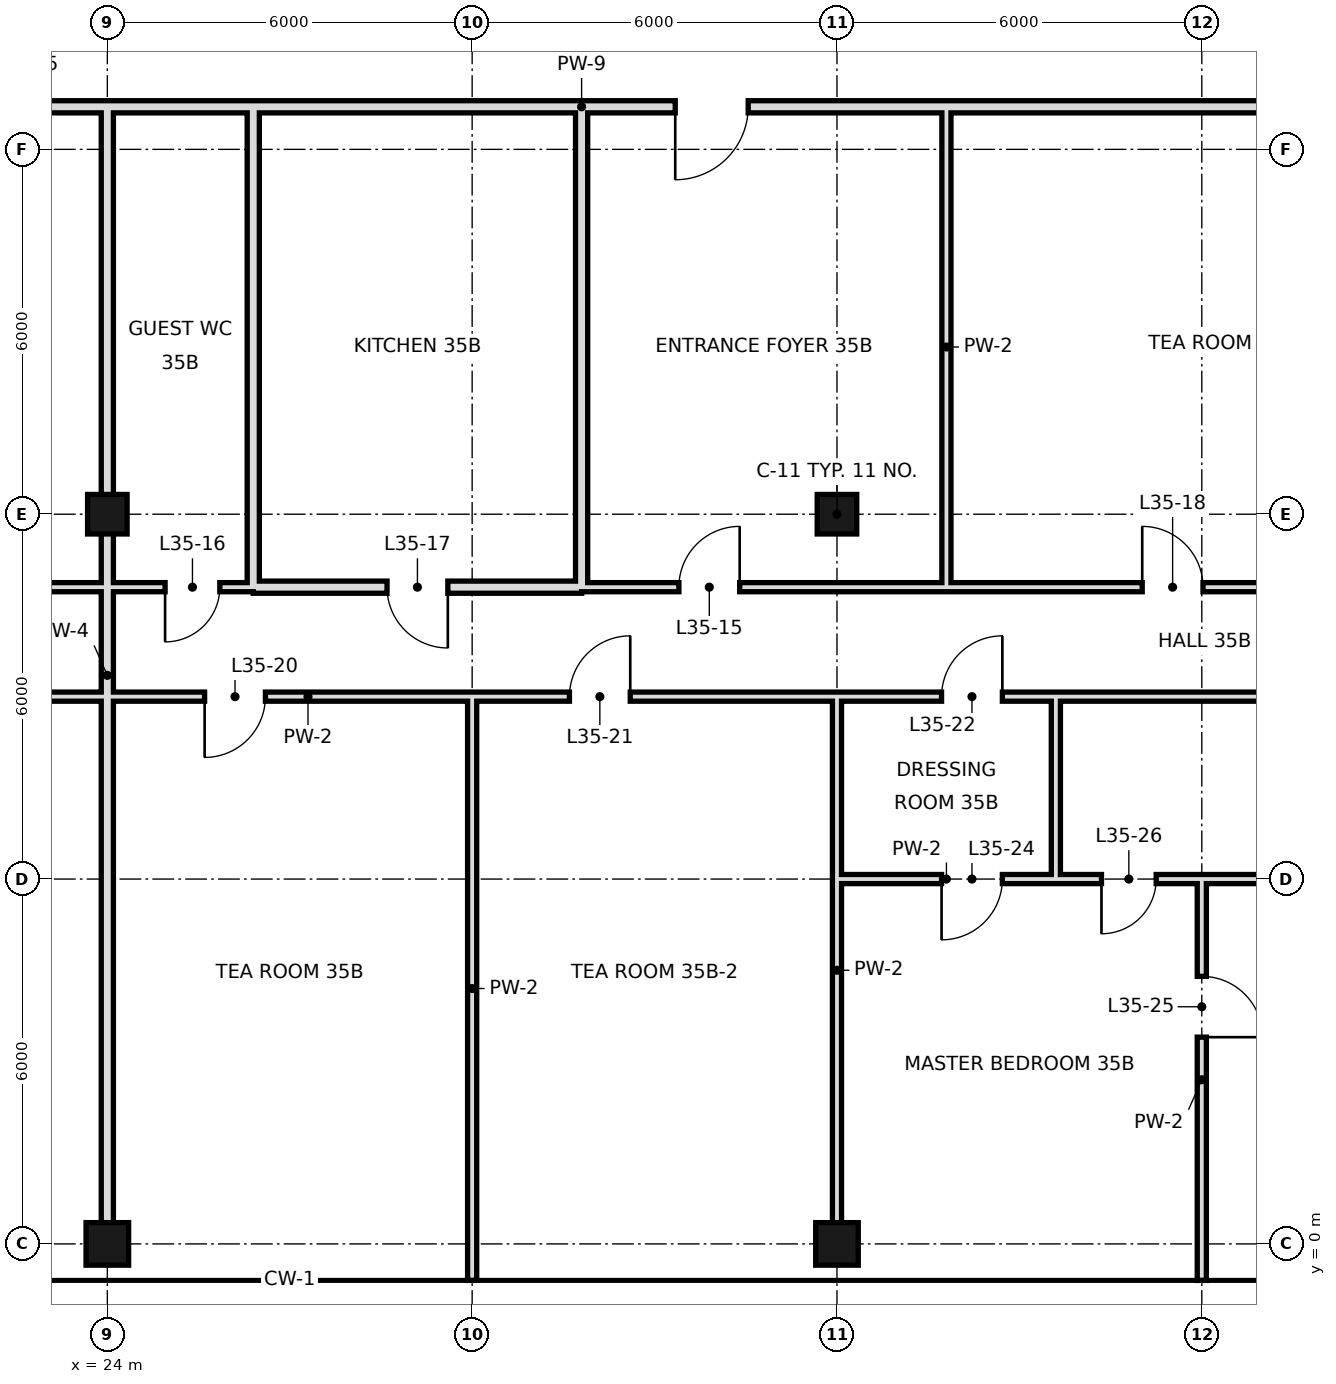
"""IFC4 building model, lengths in metres.
Left out: names, types, materials, properties, quantities, classifications, styles, units other than length and angle.
Written with IfcOpenShell. Run it as: python <this file> out.ifc"""

import sys

from ifc_helpers import new_model, si_unit, direction, frame, frame_2d, origin, origin_2d, place, context, subcontext, project, spatial, rectangle, hollow_rectangle, extrude, element, fill, save


model = new_model("IFC4")
c1 = context("Model", 3, precision=1e-05, world=origin(), true_north=direction((0.0, 1.0)))
c2 = subcontext(c1, "Body", "Model", "MODEL_VIEW")
j1 = project(units=[si_unit("LENGTHUNIT", "METRE"), si_unit("PLANEANGLEUNIT", "RADIAN")], contexts=[c1])
p1 = place(None, origin())
s1 = spatial("IfcSite", under=j1, at=p1, CompositionType="ELEMENT")
p2 = place(p1, origin())
s2 = spatial("IfcBuilding", under=s1, at=p2, CompositionType="ELEMENT")
p3 = place(p2, frame((0.0, 0.0, 154.6)))
s3 = spatial("IfcBuildingStorey", under=s2, at=p3, CompositionType="ELEMENT", Elevation=154.6)
p4 = place(p3, frame((24.0, 0.0, 0.0), z_axis=(0.0, 0.0, 1.0), x_axis=(1.0, 0.0, 0.0)))
e1 = element("IfcColumn", 1, at=p4, inside=s3, PredefinedType="COLUMN", context=c2, shape_type="SweptSolid", body=[
    extrude(hollow_rectangle(XDim=0.7, YDim=0.7, WallThickness=0.036, at=origin_2d()), origin(), (0.0, 0.0, 1.0), 3.6),
])
p5 = place(p3, frame((24.0, 12.0, 0.0), z_axis=(0.0, 0.0, 1.0), x_axis=(1.0, 0.0, 0.0)))
e2 = element("IfcColumn", 2, at=p5, inside=s3, PredefinedType="COLUMN", context=c2, shape_type="SweptSolid", body=[
    extrude(hollow_rectangle(XDim=0.65, YDim=0.65, WallThickness=0.032, at=origin_2d()), origin(), (0.0, 0.0, 1.0), 3.6),
])
p6 = place(p3, frame((36.0, 0.0, 0.0), z_axis=(0.0, 0.0, 1.0), x_axis=(1.0, 0.0, 0.0)))
e3 = element("IfcColumn", 3, at=p6, inside=s3, PredefinedType="COLUMN", context=c2, shape_type="SweptSolid", body=[
    extrude(hollow_rectangle(XDim=0.7, YDim=0.7, WallThickness=0.036, at=origin_2d()), origin(), (0.0, 0.0, 1.0), 3.6),
])
p7 = place(p3, frame((36.0, 12.0, 0.0), z_axis=(0.0, 0.0, 1.0), x_axis=(1.0, 0.0, 0.0)))
e4 = element("IfcColumn", 4, at=p7, inside=s3, PredefinedType="COLUMN", context=c2, shape_type="SweptSolid", body=[
    extrude(hollow_rectangle(XDim=0.65, YDim=0.65, WallThickness=0.032, at=origin_2d()), origin(), (0.0, 0.0, 1.0), 3.6),
])
p8 = place(p3, frame((24.0, 0.0, 0.0), z_axis=(0.0, 0.0, 1.0), x_axis=(0.0, 1.0, 0.0)))
e5 = element("IfcWall", 5, at=p8, inside=s3, PredefinedType="SOLIDWALL", context=c2, shape_type="SweptSolid", body=[
    extrude(rectangle(XDim=18.7, YDim=0.2, at=frame_2d((9.35, 0.0))), origin(), (0.0, 0.0, 1.0), 2.72),
])
p9 = place(p3, frame((26.4, 10.8, 0.0), z_axis=(0.0, 0.0, 1.0), x_axis=(0.0, 1.0, 0.0)))
e6 = element("IfcWall", 6, at=p9, inside=s3, PredefinedType="SOLIDWALL", context=c2, shape_type="SweptSolid", body=[
    extrude(rectangle(XDim=7.9, YDim=0.2, at=frame_2d((3.95, 0.0))), origin(), (0.0, 0.0, 1.0), 2.72),
])
p10 = place(p3, frame((30.0, -0.6, 0.0), z_axis=(0.0, 0.0, 1.0), x_axis=(0.0, 1.0, 0.0)))
e7 = element("IfcWall", 7, at=p10, inside=s3, PredefinedType="PARTITIONING", context=c2, shape_type="SweptSolid", body=[
    extrude(rectangle(XDim=9.6, YDim=0.15, at=frame_2d((4.8, 0.0))), origin(), (0.0, 0.0, 1.0), 2.72),
])
p11 = place(p3, frame((31.8, 10.8, 0.0), z_axis=(0.0, 0.0, 1.0), x_axis=(0.0, 1.0, 0.0)))
e8 = element("IfcWall", 8, at=p11, inside=s3, PredefinedType="SOLIDWALL", context=c2, shape_type="SweptSolid", body=[
    extrude(rectangle(XDim=7.9, YDim=0.2, at=frame_2d((3.95, 0.0))), origin(), (0.0, 0.0, 1.0), 3.42),
])
p12 = place(p3, frame((36.0, 0.0, 0.0), z_axis=(0.0, 0.0, 1.0), x_axis=(0.0, 1.0, 0.0)))
e9 = element("IfcWall", 9, at=p12, inside=s3, PredefinedType="PARTITIONING", context=c2, shape_type="SweptSolid", body=[
    extrude(rectangle(XDim=9.0, YDim=0.15, at=frame_2d((4.5, 0.0))), origin(), (0.0, 0.0, 1.0), 2.72),
])
p13 = place(p3, frame((37.8, 10.8, 0.0), z_axis=(0.0, 0.0, 1.0), x_axis=(0.0, 1.0, 0.0)))
e10 = element("IfcWall", 10, at=p13, inside=s3, PredefinedType="PARTITIONING", context=c2, shape_type="SweptSolid", body=[
    extrude(rectangle(XDim=7.9, YDim=0.15, at=frame_2d((3.95, 0.0))), origin(), (0.0, 0.0, 1.0), 3.42),
])
p14 = place(p3, frame((39.6, 6.0, 0.0), z_axis=(0.0, 0.0, 1.0), x_axis=(0.0, 1.0, 0.0)))
e11 = element("IfcWall", 11, at=p14, inside=s3, PredefinedType="PARTITIONING", context=c2, shape_type="SweptSolid", body=[
    extrude(rectangle(XDim=3.0, YDim=0.15, at=frame_2d((1.5, 0.0))), origin(), (0.0, 0.0, 1.0), 3.42),
])
p15 = place(p3, frame((42.0, -0.6, 0.0), z_axis=(0.0, 0.0, 1.0), x_axis=(0.0, 1.0, 0.0)))
e12 = element("IfcWall", 12, at=p15, inside=s3, PredefinedType="PARTITIONING", context=c2, shape_type="SweptSolid", body=[
    extrude(rectangle(XDim=6.6, YDim=0.15, at=frame_2d((3.3, 0.0))), origin(), (0.0, 0.0, 1.0), 2.72),
])
p16 = place(p15, frame((4.0, 0.0, 0.0)))
e13 = element("IfcOpeningElement", 13, at=p16, cuts=e12, PredefinedType="OPENING", context=c2, shape_type="SweptSolid", body=[
    extrude(rectangle(XDim=1.0, YDim=2.4, at=frame_2d((0.5, 1.2))), frame((0.0, 0.085, 0.0), z_axis=(0.0, -1.0, 0.0), x_axis=(1.0, 0.0, 0.0)), (0.0, 0.0, 1.0), 0.17),
])
p17 = place(p3, frame((26.4, 10.8, 0.0), z_axis=(0.0, 0.0, 1.0), x_axis=(1.0, 0.0, 0.0)))
e14 = element("IfcWall", 14, at=p17, inside=s3, PredefinedType="SOLIDWALL", context=c2, shape_type="SweptSolid", body=[
    extrude(rectangle(XDim=5.4, YDim=0.2, at=frame_2d((2.7, 0.0))), origin(), (0.0, 0.0, 1.0), 2.72),
])
p18 = place(p17, frame((2.2, 0.0, 0.0)))
e15 = element("IfcOpeningElement", 15, at=p18, cuts=e14, PredefinedType="OPENING", context=c2, shape_type="SweptSolid", body=[
    extrude(rectangle(XDim=1.0, YDim=2.4, at=frame_2d((0.5, 1.2))), frame((0.0, 0.11, 0.0), z_axis=(0.0, -1.0, 0.0), x_axis=(1.0, 0.0, 0.0)), (0.0, 0.0, 1.0), 0.22),
])
p19 = place(p3, frame((19.2, 10.8, 0.0), z_axis=(0.0, 0.0, 1.0), x_axis=(1.0, 0.0, 0.0)))
e16 = element("IfcWall", 16, at=p19, inside=s3, PredefinedType="PARTITIONING", context=c2, shape_type="SweptSolid", body=[
    extrude(rectangle(XDim=4.8, YDim=0.15, at=frame_2d((2.4, 0.0))), origin(), (0.0, 0.0, 1.0), 3.42),
])
p20 = place(p19, frame((1.9, 0.0, 0.0)))
e17 = element("IfcOpeningElement", 17, at=p20, cuts=e16, PredefinedType="OPENING", context=c2, shape_type="SweptSolid", body=[
    extrude(rectangle(XDim=1.0, YDim=2.4, at=frame_2d((0.5, 1.2))), frame((0.0, 0.085, 0.0), z_axis=(0.0, -1.0, 0.0), x_axis=(1.0, 0.0, 0.0)), (0.0, 0.0, 1.0), 0.17),
])
p21 = place(p3, frame((31.8, 10.8, 0.0), z_axis=(0.0, 0.0, 1.0), x_axis=(1.0, 0.0, 0.0)))
e18 = element("IfcWall", 18, at=p21, inside=s3, PredefinedType="PARTITIONING", context=c2, shape_type="SweptSolid", body=[
    extrude(rectangle(XDim=28.8, YDim=0.15, at=frame_2d((14.4, 0.0))), origin(), (0.0, 0.0, 1.0), 3.42),
])
p22 = place(p21, frame((1.6, 0.0, 0.0)))
e19 = element("IfcOpeningElement", 19, at=p22, cuts=e18, PredefinedType="OPENING", context=c2, shape_type="SweptSolid", body=[
    extrude(rectangle(XDim=1.0, YDim=2.4, at=frame_2d((0.5, 1.2))), frame((0.0, 0.085, 0.0), z_axis=(0.0, -1.0, 0.0), x_axis=(1.0, 0.0, 0.0)), (0.0, 0.0, 1.0), 0.17),
])
p23 = place(p21, frame((9.22, 0.0, 0.0)))
e20 = element("IfcOpeningElement", 20, at=p23, cuts=e18, PredefinedType="OPENING", context=c2, shape_type="SweptSolid", body=[
    extrude(rectangle(XDim=1.0, YDim=2.4, at=frame_2d((0.5, 1.2))), frame((0.0, 0.085, 0.0), z_axis=(0.0, -1.0, 0.0), x_axis=(1.0, 0.0, 0.0)), (0.0, 0.0, 1.0), 0.17),
])
p24 = place(p21, frame((17.65, 0.0, 0.0)))
e21 = element("IfcOpeningElement", 21, at=p24, cuts=e18, PredefinedType="OPENING", context=c2, shape_type="SweptSolid", body=[
    extrude(rectangle(XDim=1.0, YDim=2.4, at=frame_2d((0.5, 1.2))), frame((0.0, 0.085, 0.0), z_axis=(0.0, -1.0, 0.0), x_axis=(1.0, 0.0, 0.0)), (0.0, 0.0, 1.0), 0.17),
])
p25 = place(p3, frame((24.0, 10.8, 0.0), z_axis=(0.0, 0.0, 1.0), x_axis=(1.0, 0.0, 0.0)))
e22 = element("IfcWall", 22, at=p25, inside=s3, PredefinedType="PARTITIONING", context=c2, shape_type="SweptSolid", body=[
    extrude(rectangle(XDim=2.4, YDim=0.15, at=frame_2d((1.2, 0.0))), origin(), (0.0, 0.0, 1.0), 3.42),
])
p26 = place(p25, frame((0.95, 0.0, 0.0)))
e23 = element("IfcOpeningElement", 23, at=p26, cuts=e22, PredefinedType="OPENING", context=c2, shape_type="SweptSolid", body=[
    extrude(rectangle(XDim=0.9, YDim=2.4, at=frame_2d((0.45, 1.2))), frame((0.0, 0.085, 0.0), z_axis=(0.0, -1.0, 0.0), x_axis=(1.0, 0.0, 0.0)), (0.0, 0.0, 1.0), 0.17),
])
p27 = place(p3, frame((19.2, 18.7, 0.0), z_axis=(0.0, 0.0, 1.0), x_axis=(1.0, 0.0, 0.0)))
e24 = element("IfcWall", 24, at=p27, inside=s3, PredefinedType="SOLIDWALL", context=c2, shape_type="SweptSolid", body=[
    extrude(rectangle(XDim=7.2, YDim=0.2, at=frame_2d((3.6, 0.0))), origin(), (0.0, 0.0, 1.0), 3.42),
])
p28 = place(p27, frame((1.8, 0.0, 0.0)))
e25 = element("IfcOpeningElement", 25, at=p28, cuts=e24, PredefinedType="OPENING", context=c2, shape_type="SweptSolid", body=[
    extrude(rectangle(XDim=1.2, YDim=2.4, at=frame_2d((0.6, 1.2))), frame((0.0, 0.11, 0.0), z_axis=(0.0, -1.0, 0.0), x_axis=(1.0, 0.0, 0.0)), (0.0, 0.0, 1.0), 0.22),
])
p29 = place(p3, frame((31.8, 18.7, 0.0), z_axis=(0.0, 0.0, 1.0), x_axis=(1.0, 0.0, 0.0)))
e26 = element("IfcWall", 26, at=p29, inside=s3, PredefinedType="SOLIDWALL", context=c2, shape_type="SweptSolid", body=[
    extrude(rectangle(XDim=13.1, YDim=0.2, at=frame_2d((6.55, 0.0))), origin(), (0.0, 0.0, 1.0), 2.72),
])
p30 = place(p29, frame((1.54, 0.0, 0.0)))
e27 = element("IfcOpeningElement", 27, at=p30, cuts=e26, PredefinedType="OPENING", context=c2, shape_type="SweptSolid", body=[
    extrude(rectangle(XDim=1.2, YDim=2.4, at=frame_2d((0.6, 1.2))), frame((0.0, 0.11, 0.0), z_axis=(0.0, -1.0, 0.0), x_axis=(1.0, 0.0, 0.0)), (0.0, 0.0, 1.0), 0.22),
])
p31 = place(p3, frame((26.4, 18.7, 0.0), z_axis=(0.0, 0.0, 1.0), x_axis=(1.0, 0.0, 0.0)))
e28 = element("IfcWall", 28, at=p31, inside=s3, PredefinedType="SOLIDWALL", context=c2, shape_type="SweptSolid", body=[
    extrude(rectangle(XDim=5.4, YDim=0.2, at=frame_2d((2.7, 0.0))), origin(), (0.0, 0.0, 1.0), 2.72),
])
p32 = place(p3, frame((36.0, 6.0, 0.0), z_axis=(0.0, 0.0, 1.0), x_axis=(1.0, 0.0, 0.0)))
e29 = element("IfcWall", 29, at=p32, inside=s3, PredefinedType="PARTITIONING", context=c2, shape_type="SweptSolid", body=[
    extrude(rectangle(XDim=3.6, YDim=0.15, at=frame_2d((1.8, 0.0))), origin(), (0.0, 0.0, 1.0), 2.97),
])
p33 = place(p32, frame((1.72, 0.0, 0.0)))
e30 = element("IfcOpeningElement", 30, at=p33, cuts=e29, PredefinedType="OPENING", context=c2, shape_type="SweptSolid", body=[
    extrude(rectangle(XDim=1.0, YDim=2.4, at=frame_2d((0.5, 1.2))), frame((0.0, 0.085, 0.0), z_axis=(0.0, -1.0, 0.0), x_axis=(1.0, 0.0, 0.0)), (0.0, 0.0, 1.0), 0.17),
])
p34 = place(p3, frame((39.6, 6.0, 0.0), z_axis=(0.0, 0.0, 1.0), x_axis=(1.0, 0.0, 0.0)))
e31 = element("IfcWall", 31, at=p34, inside=s3, PredefinedType="PARTITIONING", context=c2, shape_type="SweptSolid", body=[
    extrude(rectangle(XDim=8.4, YDim=0.15, at=frame_2d((4.2, 0.0))), origin(), (0.0, 0.0, 1.0), 2.97),
])
p35 = place(p34, frame((0.75, 0.0, 0.0)))
e32 = element("IfcOpeningElement", 32, at=p35, cuts=e31, PredefinedType="OPENING", context=c2, shape_type="SweptSolid", body=[
    extrude(rectangle(XDim=0.9, YDim=2.4, at=frame_2d((0.45, 1.2))), frame((0.0, 0.085, 0.0), z_axis=(0.0, -1.0, 0.0), x_axis=(1.0, 0.0, 0.0)), (0.0, 0.0, 1.0), 0.17),
])
p36 = place(p3, frame((15.0, 9.0, 0.0), z_axis=(0.0, 0.0, 1.0), x_axis=(1.0, 0.0, 0.0)))
e33 = element("IfcWall", 33, at=p36, inside=s3, PredefinedType="PARTITIONING", context=c2, shape_type="SweptSolid", body=[
    extrude(rectangle(XDim=24.6, YDim=0.15, at=frame_2d((12.3, 0.0))), origin(), (0.0, 0.0, 1.0), 3.42),
])
p37 = place(p36, frame((1.3, 0.0, 0.0)))
e34 = element("IfcOpeningElement", 34, at=p37, cuts=e33, PredefinedType="OPENING", context=c2, shape_type="SweptSolid", body=[
    extrude(rectangle(XDim=1.0, YDim=2.4, at=frame_2d((0.5, 1.2))), frame((0.0, 0.085, 0.0), z_axis=(0.0, -1.0, 0.0), x_axis=(1.0, 0.0, 0.0)), (0.0, 0.0, 1.0), 0.17),
])
p38 = place(p36, frame((5.84, 0.0, 0.0)))
e35 = element("IfcOpeningElement", 35, at=p38, cuts=e33, PredefinedType="OPENING", context=c2, shape_type="SweptSolid", body=[
    extrude(rectangle(XDim=1.8, YDim=2.4, at=frame_2d((0.9, 1.2))), frame((0.0, 0.085, 0.0), z_axis=(0.0, -1.0, 0.0), x_axis=(1.0, 0.0, 0.0)), (0.0, 0.0, 1.0), 0.17),
])
p39 = place(p36, frame((10.6, 0.0, 0.0)))
e36 = element("IfcOpeningElement", 36, at=p39, cuts=e33, PredefinedType="OPENING", context=c2, shape_type="SweptSolid", body=[
    extrude(rectangle(XDim=1.0, YDim=2.4, at=frame_2d((0.5, 1.2))), frame((0.0, 0.085, 0.0), z_axis=(0.0, -1.0, 0.0), x_axis=(1.0, 0.0, 0.0)), (0.0, 0.0, 1.0), 0.17),
])
p40 = place(p36, frame((16.6, 0.0, 0.0)))
e37 = element("IfcOpeningElement", 37, at=p40, cuts=e33, PredefinedType="OPENING", context=c2, shape_type="SweptSolid", body=[
    extrude(rectangle(XDim=1.0, YDim=2.4, at=frame_2d((0.5, 1.2))), frame((0.0, 0.085, 0.0), z_axis=(0.0, -1.0, 0.0), x_axis=(1.0, 0.0, 0.0)), (0.0, 0.0, 1.0), 0.17),
])
p41 = place(p36, frame((22.72, 0.0, 0.0)))
e38 = element("IfcOpeningElement", 38, at=p41, cuts=e33, PredefinedType="OPENING", context=c2, shape_type="SweptSolid", body=[
    extrude(rectangle(XDim=1.0, YDim=2.4, at=frame_2d((0.5, 1.2))), frame((0.0, 0.085, 0.0), z_axis=(0.0, -1.0, 0.0), x_axis=(1.0, 0.0, 0.0)), (0.0, 0.0, 1.0), 0.17),
])
p42 = place(p3, frame((39.6, 9.0, 0.0), z_axis=(0.0, 0.0, 1.0), x_axis=(1.0, 0.0, 0.0)))
e39 = element("IfcWall", 39, at=p42, inside=s3, PredefinedType="PARTITIONING", context=c2, shape_type="SweptSolid", body=[
    extrude(rectangle(XDim=8.4, YDim=0.15, at=frame_2d((4.2, 0.0))), origin(), (0.0, 0.0, 1.0), 3.42),
])
p43 = place(p22, frame((1.0, 0.0, 0.0), z_axis=(0.0, 0.0, 1.0), x_axis=(-1.0, 0.0, 0.0)))
e40 = element("IfcDoor", 40, at=p43, inside=s3, OperationType="SINGLE_SWING_LEFT", PredefinedType="DOOR", context=c2, shape_type="SweptSolid", body=[
    extrude(rectangle(XDim=1.0, YDim=2.4, at=frame_2d((0.5, 1.2))), frame((0.0, 0.025, 0.0), z_axis=(0.0, -1.0, 0.0), x_axis=(1.0, 0.0, 0.0)), (0.0, 0.0, 1.0), 0.05),
])
fill(e19, e40)
p44 = place(p26, frame((0.9, 0.0, 0.0), z_axis=(0.0, 0.0, 1.0), x_axis=(-1.0, 0.0, 0.0)))
e41 = element("IfcDoor", 41, at=p44, inside=s3, OperationType="SINGLE_SWING_RIGHT", PredefinedType="DOOR", context=c2, shape_type="SweptSolid", body=[
    extrude(rectangle(XDim=0.9, YDim=2.4, at=frame_2d((0.45, 1.2))), frame((0.0, 0.025, 0.0), z_axis=(0.0, -1.0, 0.0), x_axis=(1.0, 0.0, 0.0)), (0.0, 0.0, 1.0), 0.05),
])
fill(e23, e41)
p45 = place(p18, origin())
e42 = element("IfcDoor", 42, at=p45, inside=s3, OperationType="SINGLE_SWING_RIGHT", PredefinedType="DOOR", context=c2, shape_type="SweptSolid", body=[
    extrude(rectangle(XDim=1.0, YDim=2.4, at=frame_2d((0.5, 1.2))), frame((0.0, 0.025, 0.0), z_axis=(0.0, -1.0, 0.0), x_axis=(1.0, 0.0, 0.0)), (0.0, 0.0, 1.0), 0.05),
])
fill(e15, e42)
p46 = place(p23, origin())
e43 = element("IfcDoor", 43, at=p46, inside=s3, OperationType="SINGLE_SWING_LEFT", PredefinedType="DOOR", context=c2, shape_type="SweptSolid", body=[
    extrude(rectangle(XDim=1.0, YDim=2.4, at=frame_2d((0.5, 1.2))), frame((0.0, 0.025, 0.0), z_axis=(0.0, -1.0, 0.0), x_axis=(1.0, 0.0, 0.0)), (0.0, 0.0, 1.0), 0.05),
])
fill(e20, e43)
p47 = place(p39, frame((1.0, 0.0, 0.0), z_axis=(0.0, 0.0, 1.0), x_axis=(-1.0, 0.0, 0.0)))
e44 = element("IfcDoor", 44, at=p47, inside=s3, OperationType="SINGLE_SWING_RIGHT", PredefinedType="DOOR", context=c2, shape_type="SweptSolid", body=[
    extrude(rectangle(XDim=1.0, YDim=2.4, at=frame_2d((0.5, 1.2))), frame((0.0, 0.025, 0.0), z_axis=(0.0, -1.0, 0.0), x_axis=(1.0, 0.0, 0.0)), (0.0, 0.0, 1.0), 0.05),
])
fill(e36, e44)
p48 = place(p40, frame((1.0, 0.0, 0.0), z_axis=(0.0, 0.0, 1.0), x_axis=(-1.0, 0.0, 0.0)))
e45 = element("IfcDoor", 45, at=p48, inside=s3, OperationType="SINGLE_SWING_LEFT", PredefinedType="DOOR", context=c2, shape_type="SweptSolid", body=[
    extrude(rectangle(XDim=1.0, YDim=2.4, at=frame_2d((0.5, 1.2))), frame((0.0, 0.025, 0.0), z_axis=(0.0, -1.0, 0.0), x_axis=(1.0, 0.0, 0.0)), (0.0, 0.0, 1.0), 0.05),
])
fill(e37, e45)
p49 = place(p41, frame((1.0, 0.0, 0.0), z_axis=(0.0, 0.0, 1.0), x_axis=(-1.0, 0.0, 0.0)))
e46 = element("IfcDoor", 46, at=p49, inside=s3, OperationType="SINGLE_SWING_LEFT", PredefinedType="DOOR", context=c2, shape_type="SweptSolid", body=[
    extrude(rectangle(XDim=1.0, YDim=2.4, at=frame_2d((0.5, 1.2))), frame((0.0, 0.025, 0.0), z_axis=(0.0, -1.0, 0.0), x_axis=(1.0, 0.0, 0.0)), (0.0, 0.0, 1.0), 0.05),
])
fill(e38, e46)
p50 = place(p33, frame((1.0, 0.0, 0.0), z_axis=(0.0, 0.0, 1.0), x_axis=(-1.0, 0.0, 0.0)))
e47 = element("IfcDoor", 47, at=p50, inside=s3, OperationType="SINGLE_SWING_RIGHT", PredefinedType="DOOR", context=c2, shape_type="SweptSolid", body=[
    extrude(rectangle(XDim=1.0, YDim=2.4, at=frame_2d((0.5, 1.2))), frame((0.0, 0.025, 0.0), z_axis=(0.0, -1.0, 0.0), x_axis=(1.0, 0.0, 0.0)), (0.0, 0.0, 1.0), 0.05),
])
fill(e30, e47)
p51 = place(p16, frame((1.0, 0.0, 0.0), z_axis=(0.0, 0.0, 1.0), x_axis=(-1.0, 0.0, 0.0)))
e48 = element("IfcDoor", 48, at=p51, inside=s3, OperationType="SINGLE_SWING_RIGHT", PredefinedType="DOOR", context=c2, shape_type="SweptSolid", body=[
    extrude(rectangle(XDim=1.0, YDim=2.4, at=frame_2d((0.5, 1.2))), frame((0.0, 0.025, 0.0), z_axis=(0.0, -1.0, 0.0), x_axis=(1.0, 0.0, 0.0)), (0.0, 0.0, 1.0), 0.05),
])
fill(e13, e48)
p52 = place(p35, frame((0.9, 0.0, 0.0), z_axis=(0.0, 0.0, 1.0), x_axis=(-1.0, 0.0, 0.0)))
e49 = element("IfcDoor", 49, at=p52, inside=s3, OperationType="SINGLE_SWING_RIGHT", PredefinedType="DOOR", context=c2, shape_type="SweptSolid", body=[
    extrude(rectangle(XDim=0.9, YDim=2.4, at=frame_2d((0.45, 1.2))), frame((0.0, 0.025, 0.0), z_axis=(0.0, -1.0, 0.0), x_axis=(1.0, 0.0, 0.0)), (0.0, 0.0, 1.0), 0.05),
])
fill(e32, e49)
p53 = place(p30, frame((1.2, 0.0, 0.0), z_axis=(0.0, 0.0, 1.0), x_axis=(-1.0, 0.0, 0.0)))
e50 = element("IfcDoor", 50, at=p53, inside=s3, OperationType="SINGLE_SWING_RIGHT", PredefinedType="DOOR", context=c2, shape_type="SweptSolid", body=[
    extrude(rectangle(XDim=1.2, YDim=2.4, at=frame_2d((0.6, 1.2))), frame((0.0, 0.025, 0.0), z_axis=(0.0, -1.0, 0.0), x_axis=(1.0, 0.0, 0.0)), (0.0, 0.0, 1.0), 0.05),
])
fill(e27, e50)
save(model, sys.argv[1])
